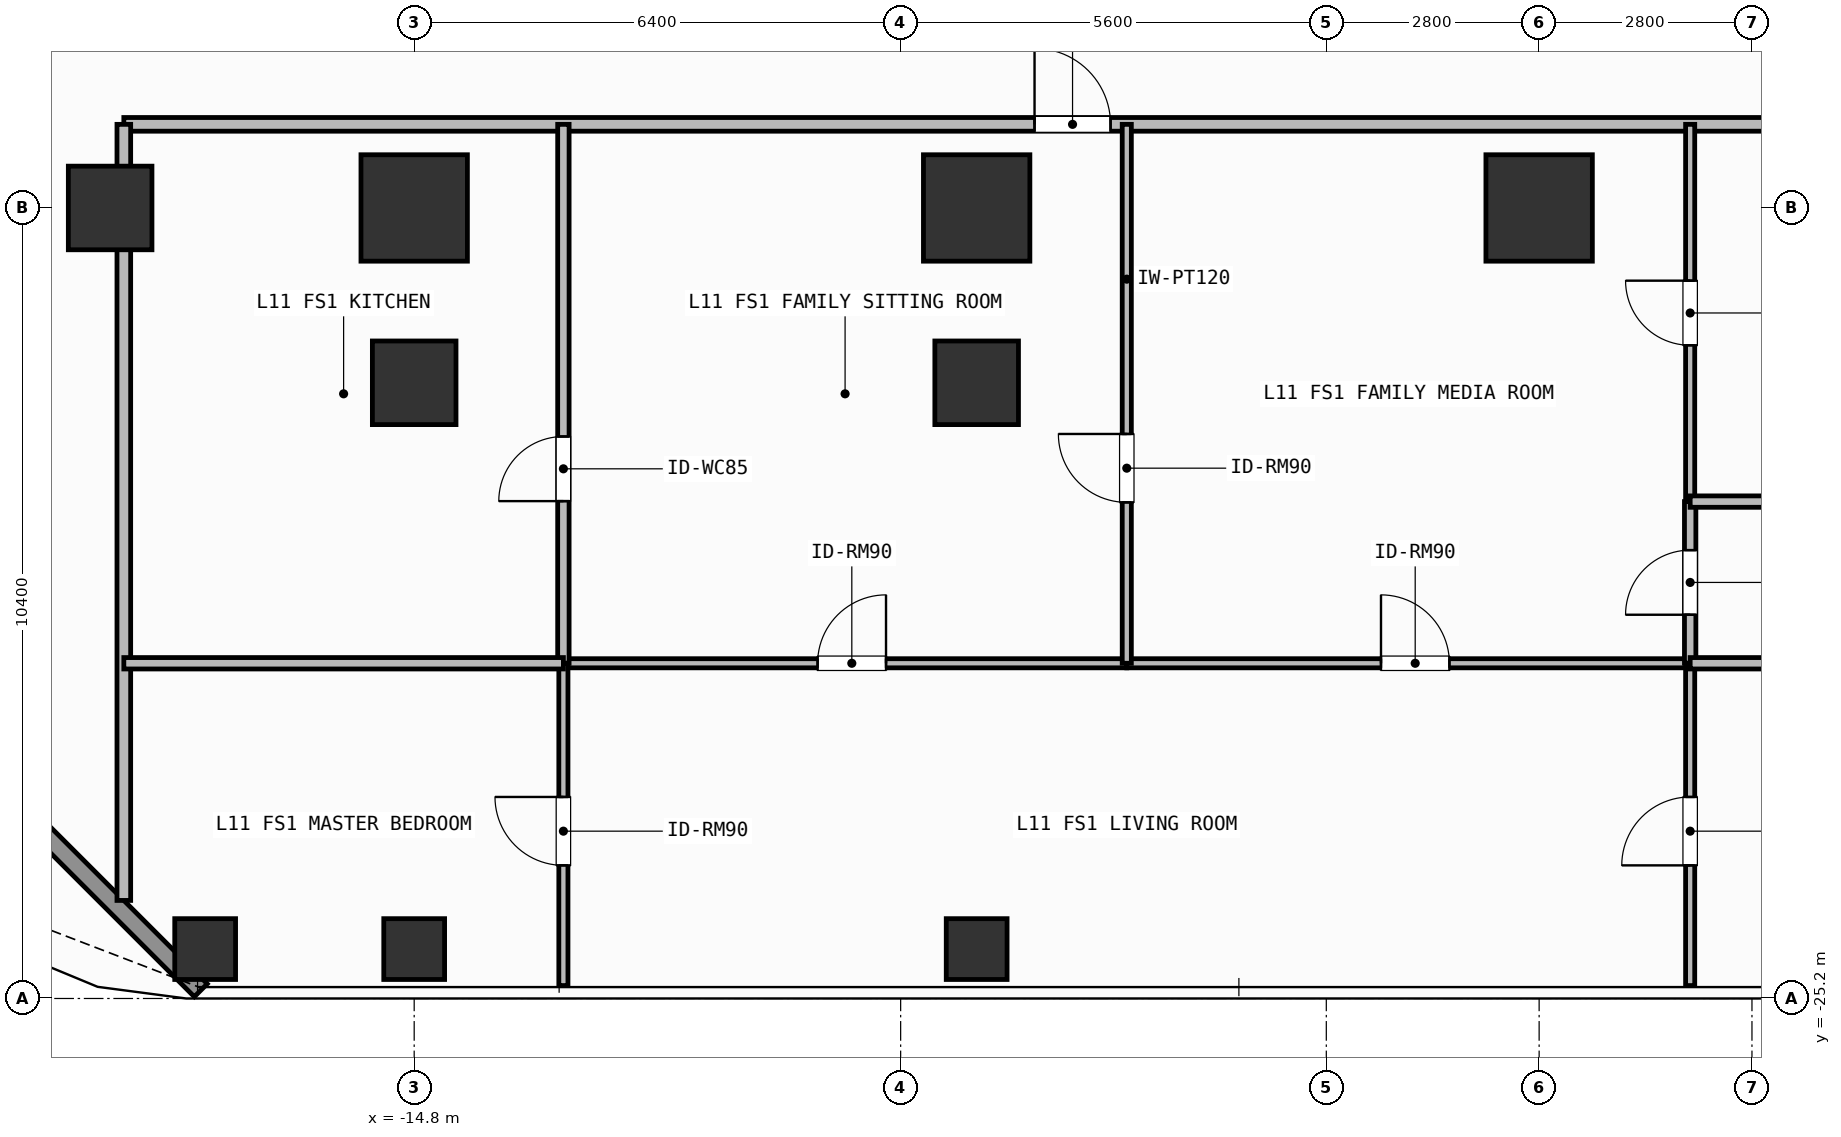
"""IFC4 building model, lengths in metres.
Left out: names, types, materials, properties, quantities, classifications, styles, units other than length and angle.
Written with IfcOpenShell. Run it as: python <this file> out.ifc"""

import sys

from ifc_helpers import new_model, si_unit, direction, frame, frame_2d, origin, origin_2d, place, context, subcontext, project, spatial, rectangle, hollow_rectangle, extrude, element, fill, save


model = new_model("IFC4")
c1 = context("Model", 3, precision=1e-05, world=origin(), true_north=direction((0.0, 1.0)))
c2 = subcontext(c1, "Body", "Model", "MODEL_VIEW")
j1 = project(units=[si_unit("LENGTHUNIT", "METRE"), si_unit("PLANEANGLEUNIT", "RADIAN")], contexts=[c1])
p1 = place(None, origin())
s1 = spatial("IfcSite", under=j1, at=p1, CompositionType="ELEMENT")
p2 = place(p1, origin())
s2 = spatial("IfcBuilding", under=s1, at=p2, CompositionType="ELEMENT")
p3 = place(p2, frame((0.0, 0.0, 42.3)))
s3 = spatial("IfcBuildingStorey", under=s2, at=p3, CompositionType="ELEMENT", Elevation=42.3)
for number, where, z_axis, x_axis in (
    (1, (-14.8, -14.8, 0.0), (0.0, 0.0, 1.0), (1.0, 0.0, 0.0)),
    (2, (-7.4, -14.8, 0.0), (0.0, 0.0, 1.0), (1.0, 0.0, 0.0)),
    (3, (0.0, -14.8, 0.0), (0.0, 0.0, 1.0), (1.0, 0.0, 0.0)),
):
    element("IfcColumn", number, at=place(p3, frame(where, z_axis=z_axis, x_axis=x_axis)), inside=s3, PredefinedType="COLUMN", context=c2, shape_type="SweptSolid", body=[
        extrude(rectangle(XDim=1.4, YDim=1.4, at=origin_2d()), origin(), (0.0, 0.0, 1.0), 3.9),
    ])
for number, where, z_axis, x_axis in (
    (4, (-18.8, -14.8, 0.0), (0.0, 0.0, 1.0), (1.0, 0.0, 0.0)),
    (5, (-14.8, -17.1, 0.0), (0.0, 0.0, 1.0), (1.0, 0.0, 0.0)),
    (6, (-7.4, -17.1, 0.0), (0.0, 0.0, 1.0), (1.0, 0.0, 0.0)),
):
    element("IfcColumn", number, at=place(p3, frame(where, z_axis=z_axis, x_axis=x_axis)), inside=s3, PredefinedType="COLUMN", context=c2, shape_type="SweptSolid", body=[
        extrude(rectangle(XDim=1.1, YDim=1.1, at=origin_2d()), origin(), (0.0, 0.0, 1.0), 3.9),
    ])
for number, where, z_axis, x_axis in (
    (7, (-17.55, -24.55, 0.0), (0.0, 0.0, 1.0), (1.0, 0.0, 0.0)),
    (8, (-14.8, -24.55, 0.0), (0.0, 0.0, 1.0), (1.0, 0.0, 0.0)),
    (9, (-7.4, -24.55, 0.0), (0.0, 0.0, 1.0), (1.0, 0.0, 0.0)),
):
    element("IfcColumn", number, at=place(p3, frame(where, z_axis=z_axis, x_axis=x_axis)), inside=s3, PredefinedType="COLUMN", context=c2, shape_type="SweptSolid", body=[
        extrude(hollow_rectangle(XDim=0.8, YDim=0.8, WallThickness=0.036, at=origin_2d()), origin(), (0.0, 0.0, 1.0), 3.9),
    ])
p4 = place(p3, frame((-17.608, -25.092, 0.0), z_axis=(0.0, 0.0, 1.0), x_axis=(-0.707106781187, 0.707106781187, 0.0)))
e10 = element("IfcWall", 10, at=p4, inside=s3, PredefinedType="SOLIDWALL", context=c2, shape_type="SweptSolid", body=[
    extrude(rectangle(XDim=6.484, YDim=0.24, at=frame_2d((3.242, 0.0))), origin(), (0.0, 0.0, 1.0), 3.68),
])
p5 = place(p3, frame((-18.62, -13.7, 0.0), z_axis=(0.0, 0.0, 1.0), x_axis=(1.0, 0.0, 0.0)))
e11 = element("IfcWall", 11, at=p5, inside=s3, PredefinedType="PARTITIONING", context=c2, shape_type="SweptSolid", body=[
    extrude(rectangle(XDim=24.963, YDim=0.18, at=frame_2d((12.481, 0.0))), origin(), (0.0, 0.0, 1.0), 3.68),
])
p6 = place(p5, frame((11.981, 0.0, 0.0)))
e12 = element("IfcOpeningElement", 12, at=p6, cuts=e11, PredefinedType="OPENING", context=c2, shape_type="SweptSolid", body=[
    extrude(rectangle(XDim=1.0, YDim=2.2, at=frame_2d((0.5, 1.1))), frame((0.0, 0.1, 0.0), z_axis=(0.0, -1.0, 0.0), x_axis=(1.0, 0.0, 0.0)), (0.0, 0.0, 1.0), 0.2),
])
p7 = place(p3, frame((-12.837, -20.79, 0.0), z_axis=(0.0, 0.0, 1.0), x_axis=(1.0, 0.0, 0.0)))
e13 = element("IfcWall", 13, at=p7, inside=s3, PredefinedType="PARTITIONING", context=c2, shape_type="SweptSolid", body=[
    extrude(rectangle(XDim=7.412, YDim=0.12, at=frame_2d((3.706, 0.0))), origin(), (0.0, 0.0, 1.0), 3.68),
])
p8 = place(p7, frame((3.344, 0.0, 0.0)))
e14 = element("IfcOpeningElement", 14, at=p8, cuts=e13, PredefinedType="OPENING", context=c2, shape_type="SweptSolid", body=[
    extrude(rectangle(XDim=0.9, YDim=2.1, at=frame_2d((0.45, 1.05))), frame((0.0, 0.07, 0.0), z_axis=(0.0, -1.0, 0.0), x_axis=(1.0, 0.0, 0.0)), (0.0, 0.0, 1.0), 0.14),
])
p9 = place(p3, frame((-5.425, -20.79, 0.0), z_axis=(0.0, 0.0, 1.0), x_axis=(1.0, 0.0, 0.0)))
e15 = element("IfcWall", 15, at=p9, inside=s3, PredefinedType="PARTITIONING", context=c2, shape_type="SweptSolid", body=[
    extrude(rectangle(XDim=7.412, YDim=0.12, at=frame_2d((3.706, 0.0))), origin(), (0.0, 0.0, 1.0), 3.68),
])
p10 = place(p9, frame((3.344, 0.0, 0.0)))
e16 = element("IfcOpeningElement", 16, at=p10, cuts=e15, PredefinedType="OPENING", context=c2, shape_type="SweptSolid", body=[
    extrude(rectangle(XDim=0.9, YDim=2.1, at=frame_2d((0.45, 1.05))), frame((0.0, 0.07, 0.0), z_axis=(0.0, -1.0, 0.0), x_axis=(1.0, 0.0, 0.0)), (0.0, 0.0, 1.0), 0.14),
])
p11 = place(p3, frame((-5.425, -20.79, 0.0), z_axis=(0.0, 0.0, 1.0), x_axis=(0.0, 1.0, 0.0)))
e17 = element("IfcWall", 17, at=p11, inside=s3, PredefinedType="PARTITIONING", context=c2, shape_type="SweptSolid", body=[
    extrude(rectangle(XDim=7.09, YDim=0.12, at=frame_2d((3.545, 0.0))), origin(), (0.0, 0.0, 1.0), 3.68),
])
p12 = place(p11, frame((2.117, 0.0, 0.0)))
e18 = element("IfcOpeningElement", 18, at=p12, cuts=e17, PredefinedType="OPENING", context=c2, shape_type="SweptSolid", body=[
    extrude(rectangle(XDim=0.9, YDim=2.1, at=frame_2d((0.45, 1.05))), frame((0.0, 0.07, 0.0), z_axis=(0.0, -1.0, 0.0), x_axis=(1.0, 0.0, 0.0)), (0.0, 0.0, 1.0), 0.14),
])
p13 = place(p3, frame((-12.837, -20.79, 0.0), z_axis=(0.0, 0.0, 1.0), x_axis=(0.0, 1.0, 0.0)))
e19 = element("IfcWall", 19, at=p13, inside=s3, PredefinedType="PARTITIONING", context=c2, shape_type="SweptSolid", body=[
    extrude(rectangle(XDim=7.09, YDim=0.15, at=frame_2d((3.545, 0.0))), origin(), (0.0, 0.0, 1.0), 3.68),
])
p14 = place(p13, frame((2.133, 0.0, 0.0)))
e20 = element("IfcOpeningElement", 20, at=p14, cuts=e19, PredefinedType="OPENING", context=c2, shape_type="SweptSolid", body=[
    extrude(rectangle(XDim=0.85, YDim=2.1, at=frame_2d((0.425, 1.05))), frame((0.0, 0.085, 0.0), z_axis=(0.0, -1.0, 0.0), x_axis=(1.0, 0.0, 0.0)), (0.0, 0.0, 1.0), 0.17),
])
p15 = place(p3, frame((-12.837, -25.03, 0.0), z_axis=(0.0, 0.0, 1.0), x_axis=(0.0, 1.0, 0.0)))
e21 = element("IfcWall", 21, at=p15, inside=s3, PredefinedType="PARTITIONING", context=c2, shape_type="SweptSolid", body=[
    extrude(rectangle(XDim=4.24, YDim=0.12, at=frame_2d((2.12, 0.0))), origin(), (0.0, 0.0, 1.0), 3.68),
])
p16 = place(p15, frame((1.581, 0.0, 0.0)))
e22 = element("IfcOpeningElement", 22, at=p16, cuts=e21, PredefinedType="OPENING", context=c2, shape_type="SweptSolid", body=[
    extrude(rectangle(XDim=0.9, YDim=2.1, at=frame_2d((0.45, 1.05))), frame((0.0, 0.07, 0.0), z_axis=(0.0, -1.0, 0.0), x_axis=(1.0, 0.0, 0.0)), (0.0, 0.0, 1.0), 0.14),
])
p17 = place(p3, frame((1.987, -20.79, 0.0), z_axis=(0.0, 0.0, 1.0), x_axis=(0.0, 1.0, 0.0)))
e23 = element("IfcWall", 23, at=p17, inside=s3, PredefinedType="PARTITIONING", context=c2, shape_type="SweptSolid", body=[
    extrude(rectangle(XDim=2.127, YDim=0.15, at=frame_2d((1.063, 0.0))), origin(), (0.0, 0.0, 1.0), 3.68),
])
p18 = place(p17, frame((0.638, 0.0, 0.0)))
e24 = element("IfcOpeningElement", 24, at=p18, cuts=e23, PredefinedType="OPENING", context=c2, shape_type="SweptSolid", body=[
    extrude(rectangle(XDim=0.85, YDim=2.1, at=frame_2d((0.425, 1.05))), frame((0.0, 0.085, 0.0), z_axis=(0.0, -1.0, 0.0), x_axis=(1.0, 0.0, 0.0)), (0.0, 0.0, 1.0), 0.17),
])
p19 = place(p3, frame((1.987, -18.663, 0.0), z_axis=(0.0, 0.0, 1.0), x_axis=(0.0, 1.0, 0.0)))
e25 = element("IfcWall", 25, at=p19, inside=s3, PredefinedType="PARTITIONING", context=c2, shape_type="SweptSolid", body=[
    extrude(rectangle(XDim=4.963, YDim=0.12, at=frame_2d((2.481, 0.0))), origin(), (0.0, 0.0, 1.0), 3.68),
])
p20 = place(p19, frame((2.056, 0.0, 0.0)))
e26 = element("IfcOpeningElement", 26, at=p20, cuts=e25, PredefinedType="OPENING", context=c2, shape_type="SweptSolid", body=[
    extrude(rectangle(XDim=0.85, YDim=2.1, at=frame_2d((0.425, 1.05))), frame((0.0, 0.07, 0.0), z_axis=(0.0, -1.0, 0.0), x_axis=(1.0, 0.0, 0.0)), (0.0, 0.0, 1.0), 0.14),
])
p21 = place(p3, frame((1.987, -25.03, 0.0), z_axis=(0.0, 0.0, 1.0), x_axis=(0.0, 1.0, 0.0)))
e27 = element("IfcWall", 27, at=p21, inside=s3, PredefinedType="PARTITIONING", context=c2, shape_type="SweptSolid", body=[
    extrude(rectangle(XDim=4.24, YDim=0.12, at=frame_2d((2.12, 0.0))), origin(), (0.0, 0.0, 1.0), 3.68),
])
p22 = place(p21, frame((1.581, 0.0, 0.0)))
e28 = element("IfcOpeningElement", 28, at=p22, cuts=e27, PredefinedType="OPENING", context=c2, shape_type="SweptSolid", body=[
    extrude(rectangle(XDim=0.9, YDim=2.1, at=frame_2d((0.45, 1.05))), frame((0.0, 0.07, 0.0), z_axis=(0.0, -1.0, 0.0), x_axis=(1.0, 0.0, 0.0)), (0.0, 0.0, 1.0), 0.14),
])
p23 = place(p3, frame((-18.62, -23.91, 0.0), z_axis=(0.0, 0.0, 1.0), x_axis=(0.0, 1.0, 0.0)))
e29 = element("IfcWall", 29, at=p23, inside=s3, PredefinedType="PARTITIONING", context=c2, shape_type="SweptSolid", body=[
    extrude(rectangle(XDim=10.21, YDim=0.18, at=frame_2d((5.105, 0.0))), origin(), (0.0, 0.0, 1.0), 3.082),
])
p24 = place(p3, frame((-18.62, -20.79, 0.0), z_axis=(0.0, 0.0, 1.0), x_axis=(1.0, 0.0, 0.0)))
e30 = element("IfcWall", 30, at=p24, inside=s3, PredefinedType="PARTITIONING", context=c2, shape_type="SweptSolid", body=[
    extrude(rectangle(XDim=5.783, YDim=0.15, at=frame_2d((2.892, 0.0))), origin(), (0.0, 0.0, 1.0), 3.68),
])
for number, where, z_axis, x_axis in (
    (31, (1.987, -18.663, 0.0), (0.0, 0.0, 1.0), (1.0, 0.0, 0.0)),
    (32, (1.987, -20.79, 0.0), (0.0, 0.0, 1.0), (1.0, 0.0, 0.0)),
):
    element("IfcWall", number, at=place(p3, frame(where, z_axis=z_axis, x_axis=x_axis)), inside=s3, PredefinedType="PARTITIONING", context=c2, shape_type="SweptSolid", body=[
        extrude(rectangle(XDim=4.356, YDim=0.15, at=frame_2d((2.178, 0.0))), origin(), (0.0, 0.0, 1.0), 3.68),
    ])
p25 = place(p6, origin())
e33 = element("IfcDoor", 33, at=p25, inside=s3, OperationType="SINGLE_SWING_LEFT", PredefinedType="DOOR", context=c2, shape_type="SweptSolid", body=[
    extrude(rectangle(XDim=1.0, YDim=2.2, at=frame_2d((0.5, 1.1))), frame((0.0, 0.025, 0.0), z_axis=(0.0, -1.0, 0.0), x_axis=(1.0, 0.0, 0.0)), (0.0, 0.0, 1.0), 0.05),
])
fill(e12, e33)
p26 = place(p8, origin())
e34 = element("IfcDoor", 34, at=p26, inside=s3, OperationType="SINGLE_SWING_RIGHT", PredefinedType="DOOR", context=c2, shape_type="SweptSolid", body=[
    extrude(rectangle(XDim=0.9, YDim=2.1, at=frame_2d((0.45, 1.05))), frame((0.0, 0.025, 0.0), z_axis=(0.0, -1.0, 0.0), x_axis=(1.0, 0.0, 0.0)), (0.0, 0.0, 1.0), 0.05),
])
fill(e14, e34)
p27 = place(p10, origin())
e35 = element("IfcDoor", 35, at=p27, inside=s3, OperationType="SINGLE_SWING_LEFT", PredefinedType="DOOR", context=c2, shape_type="SweptSolid", body=[
    extrude(rectangle(XDim=0.9, YDim=2.1, at=frame_2d((0.45, 1.05))), frame((0.0, 0.025, 0.0), z_axis=(0.0, -1.0, 0.0), x_axis=(1.0, 0.0, 0.0)), (0.0, 0.0, 1.0), 0.05),
])
fill(e16, e35)
p28 = place(p12, origin())
e36 = element("IfcDoor", 36, at=p28, inside=s3, OperationType="SINGLE_SWING_RIGHT", PredefinedType="DOOR", context=c2, shape_type="SweptSolid", body=[
    extrude(rectangle(XDim=0.9, YDim=2.1, at=frame_2d((0.45, 1.05))), frame((0.0, 0.025, 0.0), z_axis=(0.0, -1.0, 0.0), x_axis=(1.0, 0.0, 0.0)), (0.0, 0.0, 1.0), 0.05),
])
fill(e18, e36)
p29 = place(p14, origin())
e37 = element("IfcDoor", 37, at=p29, inside=s3, OperationType="SINGLE_SWING_LEFT", PredefinedType="DOOR", context=c2, shape_type="SweptSolid", body=[
    extrude(rectangle(XDim=0.85, YDim=2.1, at=frame_2d((0.425, 1.05))), frame((0.0, 0.025, 0.0), z_axis=(0.0, -1.0, 0.0), x_axis=(1.0, 0.0, 0.0)), (0.0, 0.0, 1.0), 0.05),
])
fill(e20, e37)
p30 = place(p16, origin())
e38 = element("IfcDoor", 38, at=p30, inside=s3, OperationType="SINGLE_SWING_RIGHT", PredefinedType="DOOR", context=c2, shape_type="SweptSolid", body=[
    extrude(rectangle(XDim=0.9, YDim=2.1, at=frame_2d((0.45, 1.05))), frame((0.0, 0.025, 0.0), z_axis=(0.0, -1.0, 0.0), x_axis=(1.0, 0.0, 0.0)), (0.0, 0.0, 1.0), 0.05),
])
fill(e22, e38)
p31 = place(p18, origin())
e39 = element("IfcDoor", 39, at=p31, inside=s3, OperationType="SINGLE_SWING_LEFT", PredefinedType="DOOR", context=c2, shape_type="SweptSolid", body=[
    extrude(rectangle(XDim=0.85, YDim=2.1, at=frame_2d((0.425, 1.05))), frame((0.0, 0.025, 0.0), z_axis=(0.0, -1.0, 0.0), x_axis=(1.0, 0.0, 0.0)), (0.0, 0.0, 1.0), 0.05),
])
fill(e24, e39)
p32 = place(p20, origin())
e40 = element("IfcDoor", 40, at=p32, inside=s3, OperationType="SINGLE_SWING_RIGHT", PredefinedType="DOOR", context=c2, shape_type="SweptSolid", body=[
    extrude(rectangle(XDim=0.85, YDim=2.1, at=frame_2d((0.425, 1.05))), frame((0.0, 0.025, 0.0), z_axis=(0.0, -1.0, 0.0), x_axis=(1.0, 0.0, 0.0)), (0.0, 0.0, 1.0), 0.05),
])
fill(e26, e40)
p33 = place(p22, origin())
e41 = element("IfcDoor", 41, at=p33, inside=s3, OperationType="SINGLE_SWING_LEFT", PredefinedType="DOOR", context=c2, shape_type="SweptSolid", body=[
    extrude(rectangle(XDim=0.9, YDim=2.1, at=frame_2d((0.45, 1.05))), frame((0.0, 0.025, 0.0), z_axis=(0.0, -1.0, 0.0), x_axis=(1.0, 0.0, 0.0)), (0.0, 0.0, 1.0), 0.05),
])
fill(e28, e41)
save(model, sys.argv[1])
